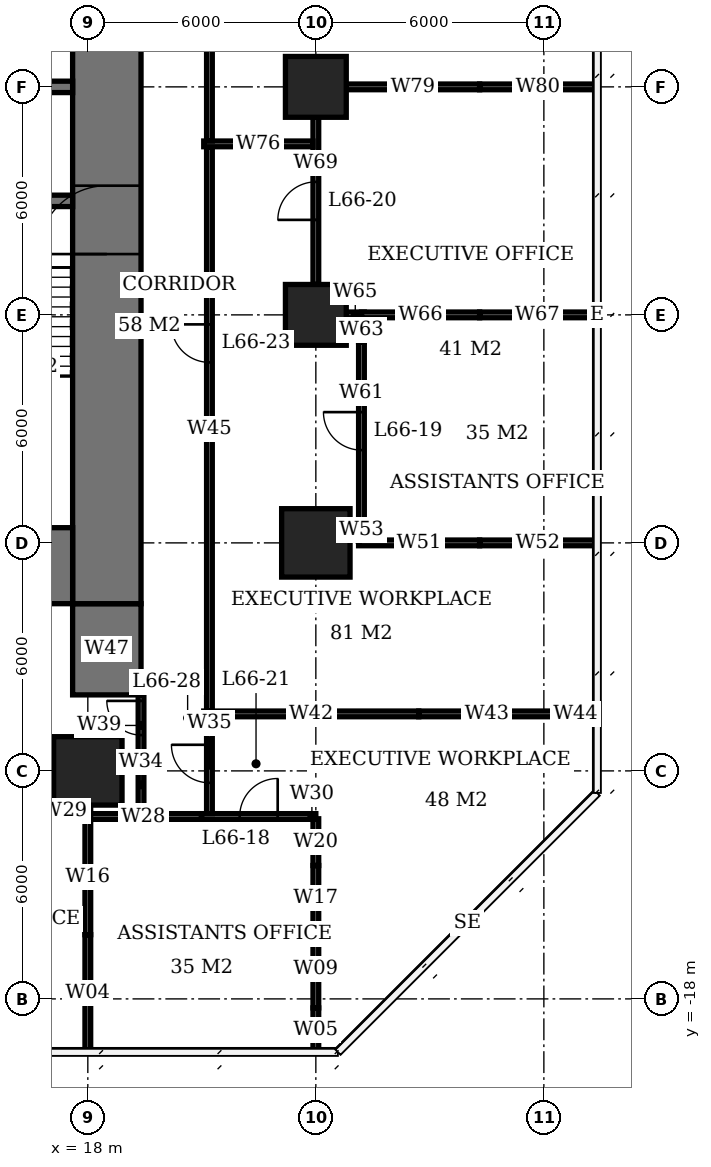
"""IFC4 building model, lengths in metres.
Left out: names, types, materials, properties, quantities, classifications, styles, units other than length and angle.
Written with IfcOpenShell. Run it as: python <this file> out.ifc"""

import sys

from ifc_helpers import new_model, si_unit, direction, frame, frame_2d, origin, origin_2d, place, context, subcontext, project, spatial, rectangle, extrude, element, fill, save


model = new_model("IFC4")
c1 = context("Model", 3, precision=1e-05, world=origin(), true_north=direction((0.0, 1.0)))
c2 = subcontext(c1, "Body", "Model", "MODEL_VIEW")
j1 = project(units=[si_unit("LENGTHUNIT", "METRE"), si_unit("PLANEANGLEUNIT", "RADIAN")], contexts=[c1])
p1 = place(None, origin())
s1 = spatial("IfcSite", under=j1, at=p1, CompositionType="ELEMENT")
p2 = place(p1, origin())
s2 = spatial("IfcBuilding", under=s1, at=p2, CompositionType="ELEMENT")
p3 = place(p2, frame((0.0, 0.0, 268.4)))
s3 = spatial("IfcBuildingStorey", under=s2, at=p3, CompositionType="ELEMENT", Elevation=268.4)
for number, where, z_axis, x_axis in (
    (1, (18.0, -12.0, 0.0), (0.0, 0.0, 1.0), (1.0, 0.0, 0.0)),
    (2, (24.0, -6.0, 0.0), (0.0, 0.0, 1.0), (1.0, 0.0, 0.0)),
):
    element("IfcColumn", number, at=place(p3, frame(where, z_axis=z_axis, x_axis=x_axis)), inside=s3, PredefinedType="COLUMN", context=c2, shape_type="SweptSolid", body=[
        extrude(rectangle(XDim=1.8, YDim=1.8, at=origin_2d()), origin(), (0.0, 0.0, 1.0), 3.9),
    ])
for number, where, z_axis, x_axis in (
    (3, (24.0, 0.0, 0.0), (0.0, 0.0, 1.0), (1.0, 0.0, 0.0)),
    (4, (24.0, 6.0, 0.0), (0.0, 0.0, 1.0), (1.0, 0.0, 0.0)),
):
    element("IfcColumn", number, at=place(p3, frame(where, z_axis=z_axis, x_axis=x_axis)), inside=s3, PredefinedType="COLUMN", context=c2, shape_type="SweptSolid", body=[
        extrude(rectangle(XDim=1.6, YDim=1.6, at=origin_2d()), origin(), (0.0, 0.0, 1.0), 3.9),
    ])
p4 = place(p3, frame((-5.6, -6.6, 0.0), z_axis=(0.0, 0.0, 1.0), x_axis=(1.0, 0.0, 0.0)))
e5 = element("IfcWall", 5, at=p4, inside=s3, PredefinedType="SHEAR", context=c2, shape_type="SweptSolid", body=[
    extrude(rectangle(XDim=23.2, YDim=2.0, at=frame_2d((11.6, 0.0))), origin(), (0.0, 0.0, 1.0), 3.9),
])
p5 = place(p3, frame((18.5, -7.6, 0.0), z_axis=(0.0, 0.0, 1.0), x_axis=(0.0, 1.0, 0.0)))
e6 = element("IfcWall", 6, at=p5, inside=s3, PredefinedType="SHEAR", context=c2, shape_type="SweptSolid", body=[
    extrude(rectangle(XDim=21.2, YDim=1.8, at=frame_2d((10.6, 0.0))), origin(), (0.0, 0.0, 1.0), 3.9),
])
p6 = place(p5, frame((9.2, 0.0, 0.0)))
e7 = element("IfcOpeningElement", 7, at=p6, cuts=e6, PredefinedType="OPENING", context=c2, shape_type="SweptSolid", body=[
    extrude(rectangle(XDim=1.8, YDim=2.4, at=frame_2d((0.9, 1.2))), frame((0.0, 0.91, 0.0), z_axis=(0.0, -1.0, 0.0), x_axis=(1.0, 0.0, 0.0)), (0.0, 0.0, 1.0), 1.82),
])
p7 = place(p3, frame((18.5, -10.0, 0.0), z_axis=(0.0, 0.0, 1.0), x_axis=(0.0, 1.0, 0.0)))
e8 = element("IfcWall", 8, at=p7, inside=s3, PredefinedType="SHEAR", context=c2, shape_type="SweptSolid", body=[
    extrude(rectangle(XDim=2.4, YDim=1.8, at=frame_2d((1.2, 0.0))), origin(), (0.0, 0.0, 1.0), 3.9),
])
p8 = place(p3, frame((12.15, 3.0, 0.0), z_axis=(0.0, 0.0, 1.0), x_axis=(1.0, 0.0, 0.0)))
e9 = element("IfcWall", 9, at=p8, inside=s3, PredefinedType="SHEAR", context=c2, shape_type="SweptSolid", body=[
    extrude(rectangle(XDim=5.45, YDim=0.3, at=frame_2d((2.725, 0.0))), origin(), (0.0, 0.0, 1.0), 3.9),
])
p9 = place(p8, frame((3.25, 0.0, 0.0)))
e10 = element("IfcOpeningElement", 10, at=p9, cuts=e9, PredefinedType="OPENING", context=c2, shape_type="SweptSolid", body=[
    extrude(rectangle(XDim=1.2, YDim=2.1, at=frame_2d((0.6, 1.05))), frame((0.0, 0.16, 0.0), z_axis=(0.0, -1.0, 0.0), x_axis=(1.0, 0.0, 0.0)), (0.0, 0.0, 1.0), 0.32),
])
p10 = place(p8, frame((0.45, 0.0, 0.0)))
e11 = element("IfcOpeningElement", 11, at=p10, cuts=e9, PredefinedType="OPENING", context=c2, shape_type="SweptSolid", body=[
    extrude(rectangle(XDim=0.9, YDim=2.1, at=frame_2d((0.45, 1.05))), frame((0.0, 0.16, 0.0), z_axis=(0.0, -1.0, 0.0), x_axis=(1.0, 0.0, 0.0)), (0.0, 0.0, 1.0), 0.32),
])
p11 = place(p3, frame((-0.15, 6.0, 0.0), z_axis=(0.0, 0.0, 1.0), x_axis=(1.0, 0.0, 0.0)))
e12 = element("IfcWall", 12, at=p11, inside=s3, PredefinedType="SHEAR", context=c2, shape_type="SweptSolid", body=[
    extrude(rectangle(XDim=17.75, YDim=0.3, at=frame_2d((8.875, 0.0))), origin(), (0.0, 0.0, 1.0), 3.9),
])
p12 = place(p11, frame((13.15, 0.0, 0.0)))
e13 = element("IfcOpeningElement", 13, at=p12, cuts=e12, PredefinedType="OPENING", context=c2, shape_type="SweptSolid", body=[
    extrude(rectangle(XDim=0.9, YDim=2.1, at=frame_2d((0.45, 1.05))), frame((0.0, 0.16, 0.0), z_axis=(0.0, -1.0, 0.0), x_axis=(1.0, 0.0, 0.0)), (0.0, 0.0, 1.0), 0.32),
])
p13 = place(p11, frame((1.1, 0.0, 0.0)))
e14 = element("IfcOpeningElement", 14, at=p13, cuts=e12, PredefinedType="OPENING", context=c2, shape_type="SweptSolid", body=[
    extrude(rectangle(XDim=1.1, YDim=2.1, at=frame_2d((0.55, 1.05))), frame((0.0, 0.16, 0.0), z_axis=(0.0, -1.0, 0.0), x_axis=(1.0, 0.0, 0.0)), (0.0, 0.0, 1.0), 0.32),
])
p14 = place(p11, frame((4.1, 0.0, 0.0)))
e15 = element("IfcOpeningElement", 15, at=p14, cuts=e12, PredefinedType="OPENING", context=c2, shape_type="SweptSolid", body=[
    extrude(rectangle(XDim=1.1, YDim=2.1, at=frame_2d((0.55, 1.05))), frame((0.0, 0.16, 0.0), z_axis=(0.0, -1.0, 0.0), x_axis=(1.0, 0.0, 0.0)), (0.0, 0.0, 1.0), 0.32),
])
p15 = place(p3, frame((17.925, -13.2, 0.0), z_axis=(0.0, 0.0, 1.0), x_axis=(1.0, 0.0, 0.0)))
e16 = element("IfcWall", 16, at=p15, inside=s3, PredefinedType="PARTITIONING", context=c2, shape_type="SweptSolid", body=[
    extrude(rectangle(XDim=3.067, YDim=0.15, at=frame_2d((1.534, 0.0))), origin(), (0.0, 0.0, 1.0), 2.65),
])
p16 = place(p3, frame((20.992, -13.2, 0.0), z_axis=(0.0, 0.0, 1.0), x_axis=(1.0, 0.0, 0.0)))
e17 = element("IfcWall", 17, at=p16, inside=s3, PredefinedType="PARTITIONING", context=c2, shape_type="SweptSolid", body=[
    extrude(rectangle(XDim=3.008, YDim=0.15, at=frame_2d((1.504, 0.0))), origin(), (0.0, 0.0, 1.0), 3.65),
])
p17 = place(p16, frame((1.004, 0.0, 0.0)))
e18 = element("IfcOpeningElement", 18, at=p17, cuts=e17, PredefinedType="OPENING", context=c2, shape_type="SweptSolid", body=[
    extrude(rectangle(XDim=1.0, YDim=2.4, at=frame_2d((0.5, 1.2))), frame((0.0, 0.085, 0.0), z_axis=(0.0, -1.0, 0.0), x_axis=(1.0, 0.0, 0.0)), (0.0, 0.0, 1.0), 0.17),
])
p18 = place(p3, frame((12.8, -12.0, 0.0), z_axis=(0.0, 0.0, 1.0), x_axis=(1.0, 0.0, 0.0)))
e19 = element("IfcWall", 19, at=p18, inside=s3, PredefinedType="PARTITIONING", context=c2, shape_type="SweptSolid", body=[
    extrude(rectangle(XDim=4.3, YDim=0.15, at=frame_2d((2.15, 0.0))), origin(), (0.0, 0.0, 1.0), 3.65),
])
p19 = place(p18, frame((1.65, 0.0, 0.0)))
e20 = element("IfcOpeningElement", 20, at=p19, cuts=e19, PredefinedType="OPENING", context=c2, shape_type="SweptSolid", body=[
    extrude(rectangle(XDim=1.0, YDim=2.4, at=frame_2d((0.5, 1.2))), frame((0.0, 0.085, 0.0), z_axis=(0.0, -1.0, 0.0), x_axis=(1.0, 0.0, 0.0)), (0.0, 0.0, 1.0), 0.17),
])
p20 = place(p3, frame((25.125, -6.0, 0.0), z_axis=(0.0, 0.0, 1.0), x_axis=(1.0, 0.0, 0.0)))
e21 = element("IfcWall", 21, at=p20, inside=s3, PredefinedType="PARTITIONING", context=c2, shape_type="SweptSolid", body=[
    extrude(rectangle(XDim=3.185, YDim=0.15, at=frame_2d((1.593, 0.0))), origin(), (0.0, 0.0, 1.0), 2.65),
])
p21 = place(p3, frame((28.31, -6.0, 0.0), z_axis=(0.0, 0.0, 1.0), x_axis=(1.0, 0.0, 0.0)))
e22 = element("IfcWall", 22, at=p21, inside=s3, PredefinedType="PARTITIONING", context=c2, shape_type="SweptSolid", body=[
    extrude(rectangle(XDim=3.065, YDim=0.15, at=frame_2d((1.532, 0.0))), origin(), (0.0, 0.0, 1.0), 3.65),
])
p22 = place(p3, frame((24.8, 0.0, 0.0), z_axis=(0.0, 0.0, 1.0), x_axis=(1.0, 0.0, 0.0)))
e23 = element("IfcWall", 23, at=p22, inside=s3, PredefinedType="PARTITIONING", context=c2, shape_type="SweptSolid", body=[
    extrude(rectangle(XDim=0.475, YDim=0.15, at=frame_2d((0.237, 0.0))), origin(), (0.0, 0.0, 1.0), 2.65),
])
p23 = place(p3, frame((25.2, 0.0, 0.0), z_axis=(0.0, 0.0, 1.0), x_axis=(1.0, 0.0, 0.0)))
e24 = element("IfcWall", 24, at=p23, inside=s3, PredefinedType="PARTITIONING", context=c2, shape_type="SweptSolid", body=[
    extrude(rectangle(XDim=3.11, YDim=0.15, at=frame_2d((1.555, 0.0))), origin(), (0.0, 0.0, 1.0), 2.65),
])
p24 = place(p3, frame((28.31, 0.0, 0.0), z_axis=(0.0, 0.0, 1.0), x_axis=(1.0, 0.0, 0.0)))
e25 = element("IfcWall", 25, at=p24, inside=s3, PredefinedType="PARTITIONING", context=c2, shape_type="SweptSolid", body=[
    extrude(rectangle(XDim=3.04, YDim=0.15, at=frame_2d((1.52, 0.0))), origin(), (0.0, 0.0, 1.0), 3.65),
])
p25 = place(p3, frame((24.8, 6.0, 0.0), z_axis=(0.0, 0.0, 1.0), x_axis=(1.0, 0.0, 0.0)))
e26 = element("IfcWall", 26, at=p25, inside=s3, PredefinedType="PARTITIONING", context=c2, shape_type="SweptSolid", body=[
    extrude(rectangle(XDim=3.51, YDim=0.15, at=frame_2d((1.755, 0.0))), origin(), (0.0, 0.0, 1.0), 2.65),
])
for number, where, z_axis, x_axis in (
    (27, (28.31, 6.0, 0.0), (0.0, 0.0, 1.0), (1.0, 0.0, 0.0)),
    (28, (18.0, -19.375, 0.0), (0.0, 0.0, 1.0), (0.0, 1.0, 0.0)),
):
    element("IfcWall", number, at=place(p3, frame(where, z_axis=z_axis, x_axis=x_axis)), inside=s3, PredefinedType="PARTITIONING", context=c2, shape_type="SweptSolid", body=[
        extrude(rectangle(XDim=3.065, YDim=0.15, at=frame_2d((1.532, 0.0))), origin(), (0.0, 0.0, 1.0), 3.65),
    ])
p26 = place(p3, frame((18.0, -16.31, 0.0), z_axis=(0.0, 0.0, 1.0), x_axis=(0.0, 1.0, 0.0)))
e29 = element("IfcWall", 29, at=p26, inside=s3, PredefinedType="PARTITIONING", context=c2, shape_type="SweptSolid", body=[
    extrude(rectangle(XDim=3.035, YDim=0.15, at=frame_2d((1.518, 0.0))), origin(), (0.0, 0.0, 1.0), 2.65),
])
p27 = place(p3, frame((18.0, -13.2, 0.0), z_axis=(0.0, 0.0, 1.0), x_axis=(0.0, 1.0, 0.0)))
e30 = element("IfcWall", 30, at=p27, inside=s3, PredefinedType="PARTITIONING", context=c2, shape_type="SweptSolid", body=[
    extrude(rectangle(XDim=0.3, YDim=0.15, at=frame_2d((0.15, 0.0))), origin(), (0.0, 0.0, 1.0), 2.65),
])
p28 = place(p3, frame((24.0, -19.375, 0.0), z_axis=(0.0, 0.0, 1.0), x_axis=(0.0, 1.0, 0.0)))
e31 = element("IfcWall", 31, at=p28, inside=s3, PredefinedType="PARTITIONING", context=c2, shape_type="SweptSolid", body=[
    extrude(rectangle(XDim=1.138, YDim=0.15, at=frame_2d((0.569, 0.0))), origin(), (0.0, 0.0, 1.0), 3.65),
])
p29 = place(p3, frame((24.0, -18.237, 0.0), z_axis=(0.0, 0.0, 1.0), x_axis=(0.0, 1.0, 0.0)))
e32 = element("IfcWall", 32, at=p29, inside=s3, PredefinedType="PARTITIONING", context=c2, shape_type="SweptSolid", body=[
    extrude(rectangle(XDim=2.029, YDim=0.15, at=frame_2d((1.015, 0.0))), origin(), (0.0, 0.0, 1.0), 2.65),
])
p30 = place(p3, frame((24.0, -16.208, 0.0), z_axis=(0.0, 0.0, 1.0), x_axis=(0.0, 1.0, 0.0)))
e33 = element("IfcWall", 33, at=p30, inside=s3, PredefinedType="PARTITIONING", context=c2, shape_type="SweptSolid", body=[
    extrude(rectangle(XDim=1.718, YDim=0.15, at=frame_2d((0.859, 0.0))), origin(), (0.0, 0.0, 1.0), 3.65),
])
p31 = place(p3, frame((24.0, -14.49, 0.0), z_axis=(0.0, 0.0, 1.0), x_axis=(0.0, 1.0, 0.0)))
e34 = element("IfcWall", 34, at=p31, inside=s3, PredefinedType="PARTITIONING", context=c2, shape_type="SweptSolid", body=[
    extrude(rectangle(XDim=1.23, YDim=0.15, at=frame_2d((0.615, 0.0))), origin(), (0.0, 0.0, 1.0), 2.65),
])
p32 = place(p3, frame((24.0, 0.8, 0.0), z_axis=(0.0, 0.0, 1.0), x_axis=(0.0, 1.0, 0.0)))
e35 = element("IfcWall", 35, at=p32, inside=s3, PredefinedType="PARTITIONING", context=c2, shape_type="SweptSolid", body=[
    extrude(rectangle(XDim=4.4, YDim=0.15, at=frame_2d((2.2, 0.0))), origin(), (0.0, 0.0, 1.0), 3.65),
])
p33 = place(p32, frame((1.7, 0.0, 0.0)))
e36 = element("IfcOpeningElement", 36, at=p33, cuts=e35, PredefinedType="OPENING", context=c2, shape_type="SweptSolid", body=[
    extrude(rectangle(XDim=1.0, YDim=2.4, at=frame_2d((0.5, 1.2))), frame((0.0, 0.085, 0.0), z_axis=(0.0, -1.0, 0.0), x_axis=(1.0, 0.0, 0.0)), (0.0, 0.0, 1.0), 0.17),
])
p34 = place(p3, frame((25.2, -5.925, 0.0), z_axis=(0.0, 0.0, 1.0), x_axis=(0.0, 1.0, 0.0)))
e37 = element("IfcWall", 37, at=p34, inside=s3, PredefinedType="PARTITIONING", context=c2, shape_type="SweptSolid", body=[
    extrude(rectangle(XDim=0.517, YDim=0.15, at=frame_2d((0.259, 0.0))), origin(), (0.0, 0.0, 1.0), 2.65),
])
p35 = place(p3, frame((25.2, -5.408, 0.0), z_axis=(0.0, 0.0, 1.0), x_axis=(0.0, 1.0, 0.0)))
e38 = element("IfcWall", 38, at=p35, inside=s3, PredefinedType="PARTITIONING", context=c2, shape_type="SweptSolid", body=[
    extrude(rectangle(XDim=4.698, YDim=0.15, at=frame_2d((2.349, 0.0))), origin(), (0.0, 0.0, 1.0), 3.65),
])
p36 = place(p35, frame((1.849, 0.0, 0.0)))
e39 = element("IfcOpeningElement", 39, at=p36, cuts=e38, PredefinedType="OPENING", context=c2, shape_type="SweptSolid", body=[
    extrude(rectangle(XDim=1.0, YDim=2.4, at=frame_2d((0.5, 1.2))), frame((0.0, 0.085, 0.0), z_axis=(0.0, -1.0, 0.0), x_axis=(1.0, 0.0, 0.0)), (0.0, 0.0, 1.0), 0.17),
])
p37 = place(p3, frame((25.2, -0.71, 0.0), z_axis=(0.0, 0.0, 1.0), x_axis=(0.0, 1.0, 0.0)))
e40 = element("IfcWall", 40, at=p37, inside=s3, PredefinedType="PARTITIONING", context=c2, shape_type="SweptSolid", body=[
    extrude(rectangle(XDim=0.635, YDim=0.15, at=frame_2d((0.317, 0.0))), origin(), (0.0, 0.0, 1.0), 2.65),
])
p38 = place(p3, frame((19.4, -13.125, 0.0), z_axis=(0.0, 0.0, 1.0), x_axis=(0.0, 1.0, 0.0)))
e41 = element("IfcWall", 41, at=p38, inside=s3, PredefinedType="PARTITIONING", context=c2, shape_type="SweptSolid", body=[
    extrude(rectangle(XDim=1.517, YDim=0.15, at=frame_2d((0.759, 0.0))), origin(), (0.0, 0.0, 1.0), 2.65),
])
p39 = place(p3, frame((19.4, -11.608, 0.0), z_axis=(0.0, 0.0, 1.0), x_axis=(0.0, 1.0, 0.0)))
e42 = element("IfcWall", 42, at=p39, inside=s3, PredefinedType="PARTITIONING", context=c2, shape_type="SweptSolid", body=[
    extrude(rectangle(XDim=1.608, YDim=0.15, at=frame_2d((0.804, 0.0))), origin(), (0.0, 0.0, 1.0), 3.65),
])
p40 = place(p39, frame((0.55, 0.0, 0.0)))
e43 = element("IfcOpeningElement", 43, at=p40, cuts=e42, PredefinedType="OPENING", context=c2, shape_type="SweptSolid", body=[
    extrude(rectangle(XDim=0.9, YDim=2.1, at=frame_2d((0.45, 1.05))), frame((0.0, 0.085, 0.0), z_axis=(0.0, -1.0, 0.0), x_axis=(1.0, 0.0, 0.0)), (0.0, 0.0, 1.0), 0.17),
])
p41 = place(p3, frame((21.2, -13.125, 0.0), z_axis=(0.0, 0.0, 1.0), x_axis=(0.0, 1.0, 0.0)))
e44 = element("IfcWall", 44, at=p41, inside=s3, PredefinedType="PARTITIONING", context=c2, shape_type="SweptSolid", body=[
    extrude(rectangle(XDim=2.55, YDim=0.15, at=frame_2d((1.275, 0.0))), origin(), (0.0, 0.0, 1.0), 3.65),
])
p42 = place(p41, frame((0.812, 0.0, 0.0)))
e45 = element("IfcOpeningElement", 45, at=p42, cuts=e44, PredefinedType="OPENING", context=c2, shape_type="SweptSolid", body=[
    extrude(rectangle(XDim=1.0, YDim=2.4, at=frame_2d((0.5, 1.2))), frame((0.0, 0.085, 0.0), z_axis=(0.0, -1.0, 0.0), x_axis=(1.0, 0.0, 0.0)), (0.0, 0.0, 1.0), 0.17),
])
p43 = place(p3, frame((21.2, -10.425, 0.0), z_axis=(0.0, 0.0, 1.0), x_axis=(0.0, 1.0, 0.0)))
e46 = element("IfcWall", 46, at=p43, inside=s3, PredefinedType="PARTITIONING", context=c2, shape_type="SweptSolid", body=[
    extrude(rectangle(XDim=14.85, YDim=0.15, at=frame_2d((7.425, 0.0))), origin(), (0.0, 0.0, 1.0), 3.65),
])
p44 = place(p43, frame((9.175, 0.0, 0.0)))
e47 = element("IfcOpeningElement", 47, at=p44, cuts=e46, PredefinedType="OPENING", context=c2, shape_type="SweptSolid", body=[
    extrude(rectangle(XDim=1.0, YDim=2.4, at=frame_2d((0.5, 1.2))), frame((0.0, 0.085, 0.0), z_axis=(0.0, -1.0, 0.0), x_axis=(1.0, 0.0, 0.0)), (0.0, 0.0, 1.0), 0.17),
])
p45 = place(p3, frame((21.05, -10.5, 0.0), z_axis=(0.0, 0.0, 1.0), x_axis=(1.0, 0.0, 0.0)))
e48 = element("IfcWall", 48, at=p45, inside=s3, PredefinedType="PARTITIONING", context=c2, shape_type="SweptSolid", body=[
    extrude(rectangle(XDim=5.658, YDim=0.15, at=frame_2d((2.829, 0.0))), origin(), (0.0, 0.0, 1.0), 3.65),
])
p46 = place(p3, frame((26.708, -10.5, 0.0), z_axis=(0.0, 0.0, 1.0), x_axis=(1.0, 0.0, 0.0)))
e49 = element("IfcWall", 49, at=p46, inside=s3, PredefinedType="PARTITIONING", context=c2, shape_type="SweptSolid", body=[
    extrude(rectangle(XDim=3.584, YDim=0.15, at=frame_2d((1.792, 0.0))), origin(), (0.0, 0.0, 1.0), 2.65),
])
p47 = place(p3, frame((30.292, -10.5, 0.0), z_axis=(0.0, 0.0, 1.0), x_axis=(1.0, 0.0, 0.0)))
e50 = element("IfcWall", 50, at=p47, inside=s3, PredefinedType="PARTITIONING", context=c2, shape_type="SweptSolid", body=[
    extrude(rectangle(XDim=1.083, YDim=0.15, at=frame_2d((0.542, 0.0))), origin(), (0.0, 0.0, 1.0), 3.65),
])
p48 = place(p3, frame((21.2, 4.575, 0.0), z_axis=(0.0, 0.0, 1.0), x_axis=(0.0, 1.0, 0.0)))
e51 = element("IfcWall", 51, at=p48, inside=s3, PredefinedType="PARTITIONING", context=c2, shape_type="SweptSolid", body=[
    extrude(rectangle(XDim=14.8, YDim=0.15, at=frame_2d((7.4, 0.0))), origin(), (0.0, 0.0, 1.0), 3.65),
])
p49 = place(p48, frame((9.045, 0.0, 0.0)))
e52 = element("IfcOpeningElement", 52, at=p49, cuts=e51, PredefinedType="OPENING", context=c2, shape_type="SweptSolid", body=[
    extrude(rectangle(XDim=1.0, YDim=2.4, at=frame_2d((0.5, 1.2))), frame((0.0, 0.085, 0.0), z_axis=(0.0, -1.0, 0.0), x_axis=(1.0, 0.0, 0.0)), (0.0, 0.0, 1.0), 0.17),
])
p50 = place(p3, frame((21.05, 4.5, 0.0), z_axis=(0.0, 0.0, 1.0), x_axis=(1.0, 0.0, 0.0)))
e53 = element("IfcWall", 53, at=p50, inside=s3, PredefinedType="PARTITIONING", context=c2, shape_type="SweptSolid", body=[
    extrude(rectangle(XDim=2.875, YDim=0.15, at=frame_2d((1.438, 0.0))), origin(), (0.0, 0.0, 1.0), 3.65),
])
p51 = place(p6, origin())
e54 = element("IfcDoor", 54, at=p51, inside=s3, OperationType="DOUBLE_DOOR_SINGLE_SWING", PredefinedType="DOOR", context=c2, shape_type="SweptSolid", body=[
    extrude(rectangle(XDim=1.8, YDim=2.4, at=frame_2d((0.9, 1.2))), frame((0.0, 0.025, 0.0), z_axis=(0.0, -1.0, 0.0), x_axis=(1.0, 0.0, 0.0)), (0.0, 0.0, 1.0), 0.05),
])
fill(e7, e54)
p52 = place(p17, origin())
e55 = element("IfcDoor", 55, at=p52, inside=s3, OperationType="SINGLE_SWING_RIGHT", PredefinedType="DOOR", context=c2, shape_type="SweptSolid", body=[
    extrude(rectangle(XDim=1.0, YDim=2.4, at=frame_2d((0.5, 1.2))), frame((0.0, 0.025, 0.0), z_axis=(0.0, -1.0, 0.0), x_axis=(1.0, 0.0, 0.0)), (0.0, 0.0, 1.0), 0.05),
])
fill(e18, e55)
p53 = place(p36, origin())
e56 = element("IfcDoor", 56, at=p53, inside=s3, OperationType="SINGLE_SWING_RIGHT", PredefinedType="DOOR", context=c2, shape_type="SweptSolid", body=[
    extrude(rectangle(XDim=1.0, YDim=2.4, at=frame_2d((0.5, 1.2))), frame((0.0, 0.025, 0.0), z_axis=(0.0, -1.0, 0.0), x_axis=(1.0, 0.0, 0.0)), (0.0, 0.0, 1.0), 0.05),
])
fill(e39, e56)
p54 = place(p33, origin())
e57 = element("IfcDoor", 57, at=p54, inside=s3, OperationType="SINGLE_SWING_LEFT", PredefinedType="DOOR", context=c2, shape_type="SweptSolid", body=[
    extrude(rectangle(XDim=1.0, YDim=2.4, at=frame_2d((0.5, 1.2))), frame((0.0, 0.025, 0.0), z_axis=(0.0, -1.0, 0.0), x_axis=(1.0, 0.0, 0.0)), (0.0, 0.0, 1.0), 0.05),
])
fill(e36, e57)
p55 = place(p42, origin())
e58 = element("IfcDoor", 58, at=p55, inside=s3, OperationType="SINGLE_SWING_RIGHT", PredefinedType="DOOR", context=c2, shape_type="SweptSolid", body=[
    extrude(rectangle(XDim=1.0, YDim=2.4, at=frame_2d((0.5, 1.2))), frame((0.0, 0.025, 0.0), z_axis=(0.0, -1.0, 0.0), x_axis=(1.0, 0.0, 0.0)), (0.0, 0.0, 1.0), 0.05),
])
fill(e45, e58)
p56 = place(p44, origin())
e59 = element("IfcDoor", 59, at=p56, inside=s3, OperationType="SINGLE_SWING_RIGHT", PredefinedType="DOOR", context=c2, shape_type="SweptSolid", body=[
    extrude(rectangle(XDim=1.0, YDim=2.4, at=frame_2d((0.5, 1.2))), frame((0.0, 0.025, 0.0), z_axis=(0.0, -1.0, 0.0), x_axis=(1.0, 0.0, 0.0)), (0.0, 0.0, 1.0), 0.05),
])
fill(e47, e59)
p57 = place(p40, origin())
e60 = element("IfcDoor", 60, at=p57, inside=s3, OperationType="SINGLE_SWING_RIGHT", PredefinedType="DOOR", context=c2, shape_type="SweptSolid", body=[
    extrude(rectangle(XDim=0.9, YDim=2.1, at=frame_2d((0.45, 1.05))), frame((0.0, 0.025, 0.0), z_axis=(0.0, -1.0, 0.0), x_axis=(1.0, 0.0, 0.0)), (0.0, 0.0, 1.0), 0.05),
])
fill(e43, e60)
save(model, sys.argv[1])
